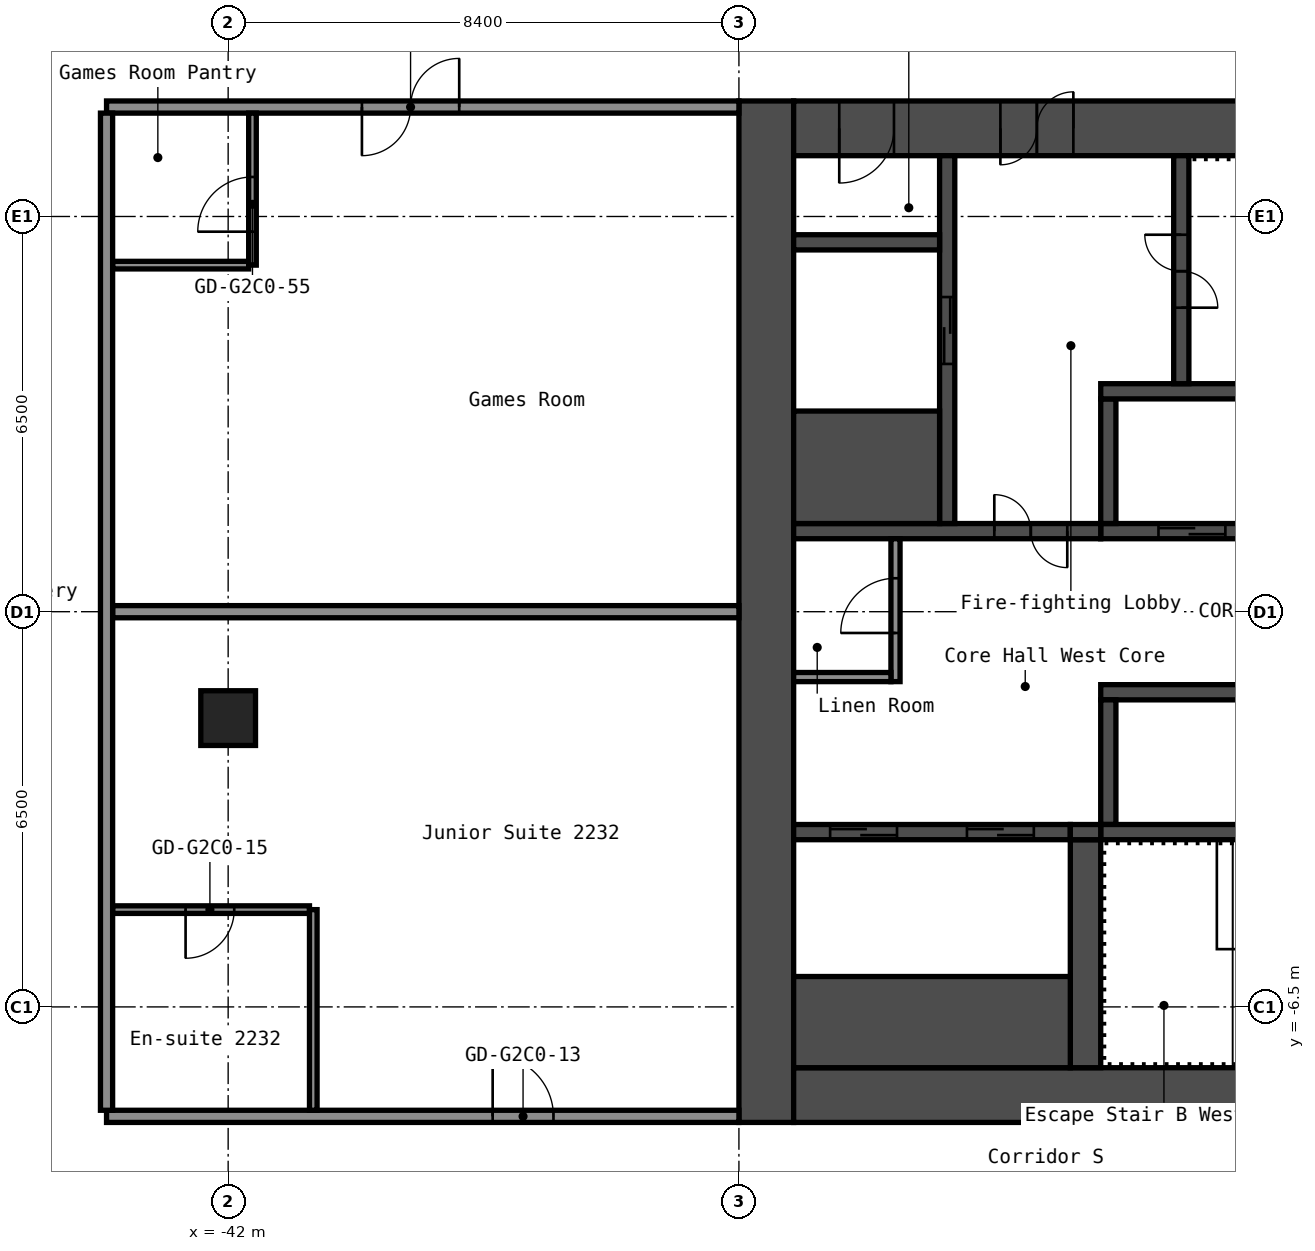
"""IFC4 building model, lengths in metres.
Left out: names, types, materials, properties, quantities, classifications, styles, units other than length and angle.
Written with IfcOpenShell. Run it as: python <this file> out.ifc"""

import sys

from ifc_helpers import new_model, si_unit, direction, frame, frame_2d, origin, origin_2d, place, context, subcontext, project, spatial, rectangle, hollow_rectangle, extrude, element, fill, save


model = new_model("IFC4")
c1 = context("Model", 3, precision=1e-05, world=origin(), true_north=direction((0.0, 1.0)))
c2 = subcontext(c1, "Body", "Model", "MODEL_VIEW")
j1 = project(units=[si_unit("LENGTHUNIT", "METRE"), si_unit("PLANEANGLEUNIT", "RADIAN")], contexts=[c1])
p1 = place(None, origin())
s1 = spatial("IfcSite", under=j1, at=p1, CompositionType="ELEMENT")
p2 = place(p1, origin())
s2 = spatial("IfcBuilding", under=s1, at=p2, CompositionType="ELEMENT")
p3 = place(p2, frame((0.0, 0.0, 81.8)))
s3 = spatial("IfcBuildingStorey", under=s2, at=p3, CompositionType="ELEMENT", Elevation=81.8)
p4 = place(p3, frame((-42.0, -1.75, 0.0), z_axis=(0.0, 0.0, 1.0), x_axis=(1.0, 0.0, 0.0)))
e1 = element("IfcColumn", 1, at=p4, inside=s3, PredefinedType="COLUMN", context=c2, shape_type="SweptSolid", body=[
    extrude(hollow_rectangle(XDim=0.9, YDim=0.9, WallThickness=0.036, at=origin_2d()), origin(), (0.0, 0.0, 1.0), 2.8),
])
p5 = place(p3, frame((-33.15, -8.4, 0.0), z_axis=(0.0, 0.0, 1.0), x_axis=(0.0, 1.0, 0.0)))
e2 = element("IfcWall", 2, at=p5, inside=s3, PredefinedType="SHEAR", context=c2, shape_type="SweptSolid", body=[
    extrude(rectangle(XDim=16.8, YDim=0.9, at=frame_2d((8.4, 0.0))), origin(), (0.0, 0.0, 1.0), 2.8),
])
p6 = place(p3, frame((-32.7, 7.95, 0.0), z_axis=(0.0, 0.0, 1.0), x_axis=(1.0, 0.0, 0.0)))
e3 = element("IfcWall", 3, at=p6, inside=s3, PredefinedType="SHEAR", context=c2, shape_type="SweptSolid", body=[
    extrude(rectangle(XDim=15.0, YDim=0.9, at=frame_2d((7.5, 0.0))), origin(), (0.0, 0.0, 1.0), 2.8),
])
p7 = place(p6, frame((3.4, 0.0, 0.0)))
e4 = element("IfcOpeningElement", 4, at=p7, cuts=e3, PredefinedType="OPENING", context=c2, shape_type="SweptSolid", body=[
    extrude(rectangle(XDim=1.2, YDim=2.1, at=frame_2d((0.6, 1.05))), frame((0.0, 0.46, 0.0), z_axis=(0.0, -1.0, 0.0), x_axis=(1.0, 0.0, 0.0)), (0.0, 0.0, 1.0), 0.92),
])
p8 = place(p6, frame((0.75, 0.0, 0.0)))
e5 = element("IfcOpeningElement", 5, at=p8, cuts=e3, PredefinedType="OPENING", context=c2, shape_type="SweptSolid", body=[
    extrude(rectangle(XDim=0.9, YDim=2.1, at=frame_2d((0.45, 1.05))), frame((0.0, 0.46, 0.0), z_axis=(0.0, -1.0, 0.0), x_axis=(1.0, 0.0, 0.0)), (0.0, 0.0, 1.0), 0.92),
])
p9 = place(p3, frame((-32.7, -7.95, 0.0), z_axis=(0.0, 0.0, 1.0), x_axis=(1.0, 0.0, 0.0)))
e6 = element("IfcWall", 6, at=p9, inside=s3, PredefinedType="SHEAR", context=c2, shape_type="SweptSolid", body=[
    extrude(rectangle(XDim=15.0, YDim=0.9, at=frame_2d((7.5, 0.0))), origin(), (0.0, 0.0, 1.0), 2.8),
])
p10 = place(p9, frame((11.45, 0.0, 0.0)))
e7 = element("IfcOpeningElement", 7, at=p10, cuts=e6, PredefinedType="OPENING", context=c2, shape_type="SweptSolid", body=[
    extrude(rectangle(XDim=1.0, YDim=2.1, at=frame_2d((0.5, 1.05))), frame((0.0, 0.46, 0.0), z_axis=(0.0, -1.0, 0.0), x_axis=(1.0, 0.0, 0.0)), (0.0, 0.0, 1.0), 0.92),
])
p11 = place(p3, frame((-27.65, 1.325, 0.0), z_axis=(0.0, 0.0, 1.0), x_axis=(1.0, 0.0, 0.0)))
e8 = element("IfcWall", 8, at=p11, inside=s3, PredefinedType="SHEAR", context=c2, shape_type="SweptSolid", body=[
    extrude(rectangle(XDim=7.5, YDim=0.25, at=frame_2d((3.75, 0.0))), origin(), (0.0, 0.0, 1.0), 2.8),
])
p12 = place(p11, frame((5.75, 0.0, 0.0)))
e9 = element("IfcOpeningElement", 9, at=p12, cuts=e8, PredefinedType="OPENING", context=c2, shape_type="SweptSolid", body=[
    extrude(rectangle(XDim=1.1, YDim=2.1, at=frame_2d((0.55, 1.05))), frame((0.0, 0.135, 0.0), z_axis=(0.0, -1.0, 0.0), x_axis=(1.0, 0.0, 0.0)), (0.0, 0.0, 1.0), 0.27),
])
p13 = place(p11, frame((3.35, 0.0, 0.0)))
e10 = element("IfcOpeningElement", 10, at=p13, cuts=e8, PredefinedType="OPENING", context=c2, shape_type="SweptSolid", body=[
    extrude(rectangle(XDim=1.1, YDim=2.1, at=frame_2d((0.55, 1.05))), frame((0.0, 0.135, 0.0), z_axis=(0.0, -1.0, 0.0), x_axis=(1.0, 0.0, 0.0)), (0.0, 0.0, 1.0), 0.27),
])
p14 = place(p11, frame((0.95, 0.0, 0.0)))
e11 = element("IfcOpeningElement", 11, at=p14, cuts=e8, PredefinedType="OPENING", context=c2, shape_type="SweptSolid", body=[
    extrude(rectangle(XDim=1.1, YDim=2.1, at=frame_2d((0.55, 1.05))), frame((0.0, 0.135, 0.0), z_axis=(0.0, -1.0, 0.0), x_axis=(1.0, 0.0, 0.0)), (0.0, 0.0, 1.0), 0.27),
])
p15 = place(p3, frame((-27.525, 1.45, 0.0), z_axis=(0.0, 0.0, 1.0), x_axis=(0.0, 1.0, 0.0)))
e12 = element("IfcWall", 12, at=p15, inside=s3, PredefinedType="SHEAR", context=c2, shape_type="SweptSolid", body=[
    extrude(rectangle(XDim=2.05, YDim=0.25, at=frame_2d((1.025, 0.0))), origin(), (0.0, 0.0, 1.0), 2.8),
])
p16 = place(p3, frame((-27.65, 3.625, 0.0), z_axis=(0.0, 0.0, 1.0), x_axis=(1.0, 0.0, 0.0)))
e13 = element("IfcWall", 13, at=p16, inside=s3, PredefinedType="SHEAR", context=c2, shape_type="SweptSolid", body=[
    extrude(rectangle(XDim=7.5, YDim=0.25, at=frame_2d((3.75, 0.0))), origin(), (0.0, 0.0, 1.0), 2.8),
])
p17 = place(p3, frame((-26.325, 3.75, 0.0), z_axis=(0.0, 0.0, 1.0), x_axis=(0.0, 1.0, 0.0)))
e14 = element("IfcWall", 14, at=p17, inside=s3, PredefinedType="SHEAR", context=c2, shape_type="SweptSolid", body=[
    extrude(rectangle(XDim=3.75, YDim=0.25, at=frame_2d((1.875, 0.0))), origin(), (0.0, 0.0, 1.0), 2.8),
])
p18 = place(p17, frame((1.25, 0.0, 0.0)))
e15 = element("IfcOpeningElement", 15, at=p18, cuts=e14, PredefinedType="OPENING", context=c2, shape_type="SweptSolid", body=[
    extrude(rectangle(XDim=1.2, YDim=2.1, at=frame_2d((0.6, 1.05))), frame((0.0, 0.135, 0.0), z_axis=(0.0, -1.0, 0.0), x_axis=(1.0, 0.0, 0.0)), (0.0, 0.0, 1.0), 0.27),
])
p19 = place(p3, frame((-32.7, 1.325, 0.0), z_axis=(0.0, 0.0, 1.0), x_axis=(1.0, 0.0, 0.0)))
e16 = element("IfcWall", 16, at=p19, inside=s3, PredefinedType="SHEAR", context=c2, shape_type="SweptSolid", body=[
    extrude(rectangle(XDim=5.05, YDim=0.25, at=frame_2d((2.525, 0.0))), origin(), (0.0, 0.0, 1.0), 2.8),
])
p20 = place(p19, frame((3.3, 0.0, 0.0)))
e17 = element("IfcOpeningElement", 17, at=p20, cuts=e16, PredefinedType="OPENING", context=c2, shape_type="SweptSolid", body=[
    extrude(rectangle(XDim=1.2, YDim=2.1, at=frame_2d((0.6, 1.05))), frame((0.0, 0.135, 0.0), z_axis=(0.0, -1.0, 0.0), x_axis=(1.0, 0.0, 0.0)), (0.0, 0.0, 1.0), 0.27),
])
p21 = place(p3, frame((-30.175, 1.45, 0.0), z_axis=(0.0, 0.0, 1.0), x_axis=(0.0, 1.0, 0.0)))
e18 = element("IfcWall", 18, at=p21, inside=s3, PredefinedType="SHEAR", context=c2, shape_type="SweptSolid", body=[
    extrude(rectangle(XDim=6.05, YDim=0.25, at=frame_2d((3.025, 0.0))), origin(), (0.0, 0.0, 1.0), 2.8),
])
p22 = place(p21, frame((2.625, 0.0, 0.0)))
e19 = element("IfcOpeningElement", 19, at=p22, cuts=e18, PredefinedType="OPENING", context=c2, shape_type="SweptSolid", body=[
    extrude(rectangle(XDim=1.1, YDim=2.1, at=frame_2d((0.55, 1.05))), frame((0.0, 0.135, 0.0), z_axis=(0.0, -1.0, 0.0), x_axis=(1.0, 0.0, 0.0)), (0.0, 0.0, 1.0), 0.27),
])
p23 = place(p3, frame((-32.7, 2.375, 0.0), z_axis=(0.0, 0.0, 1.0), x_axis=(1.0, 0.0, 0.0)))
e20 = element("IfcWall", 20, at=p23, inside=s3, PredefinedType="SHEAR", context=c2, shape_type="SweptSolid", body=[
    extrude(rectangle(XDim=2.4, YDim=1.85, at=frame_2d((1.2, 0.0))), origin(), (0.0, 0.0, 1.0), 2.8),
])
p24 = place(p3, frame((-32.7, 6.075, 0.0), z_axis=(0.0, 0.0, 1.0), x_axis=(1.0, 0.0, 0.0)))
e21 = element("IfcWall", 21, at=p24, inside=s3, PredefinedType="SHEAR", context=c2, shape_type="SweptSolid", body=[
    extrude(rectangle(XDim=2.4, YDim=0.25, at=frame_2d((1.2, 0.0))), origin(), (0.0, 0.0, 1.0), 2.8),
])
p25 = place(p3, frame((-27.65, -1.325, 0.0), z_axis=(0.0, 0.0, 1.0), x_axis=(1.0, 0.0, 0.0)))
e22 = element("IfcWall", 22, at=p25, inside=s3, PredefinedType="SHEAR", context=c2, shape_type="SweptSolid", body=[
    extrude(rectangle(XDim=7.5, YDim=0.25, at=frame_2d((3.75, 0.0))), origin(), (0.0, 0.0, 1.0), 2.8),
])
p26 = place(p3, frame((-27.525, -3.5, 0.0), z_axis=(0.0, 0.0, 1.0), x_axis=(0.0, 1.0, 0.0)))
e23 = element("IfcWall", 23, at=p26, inside=s3, PredefinedType="SHEAR", context=c2, shape_type="SweptSolid", body=[
    extrude(rectangle(XDim=2.05, YDim=0.25, at=frame_2d((1.025, 0.0))), origin(), (0.0, 0.0, 1.0), 2.8),
])
p27 = place(p3, frame((-27.65, -3.625, 0.0), z_axis=(0.0, 0.0, 1.0), x_axis=(1.0, 0.0, 0.0)))
e24 = element("IfcWall", 24, at=p27, inside=s3, PredefinedType="SHEAR", context=c2, shape_type="SweptSolid", body=[
    extrude(rectangle(XDim=7.5, YDim=0.25, at=frame_2d((3.75, 0.0))), origin(), (0.0, 0.0, 1.0), 2.8),
])
p28 = place(p3, frame((-27.9, -7.5, 0.0), z_axis=(0.0, 0.0, 1.0), x_axis=(0.0, 1.0, 0.0)))
e25 = element("IfcWall", 25, at=p28, inside=s3, PredefinedType="SHEAR", context=c2, shape_type="SweptSolid", body=[
    extrude(rectangle(XDim=3.75, YDim=0.5, at=frame_2d((1.875, 0.0))), origin(), (0.0, 0.0, 1.0), 2.8),
])
p29 = place(p3, frame((-32.7, -3.625, 0.0), z_axis=(0.0, 0.0, 1.0), x_axis=(1.0, 0.0, 0.0)))
e26 = element("IfcWall", 26, at=p29, inside=s3, PredefinedType="SHEAR", context=c2, shape_type="SweptSolid", body=[
    extrude(rectangle(XDim=4.55, YDim=0.25, at=frame_2d((2.275, 0.0))), origin(), (0.0, 0.0, 1.0), 2.8),
])
p30 = place(p29, frame((2.85, 0.0, 0.0)))
e27 = element("IfcOpeningElement", 27, at=p30, cuts=e26, PredefinedType="OPENING", context=c2, shape_type="SweptSolid", body=[
    extrude(rectangle(XDim=1.1, YDim=2.1, at=frame_2d((0.55, 1.05))), frame((0.0, 0.135, 0.0), z_axis=(0.0, -1.0, 0.0), x_axis=(1.0, 0.0, 0.0)), (0.0, 0.0, 1.0), 0.27),
])
p31 = place(p29, frame((0.6, 0.0, 0.0)))
e28 = element("IfcOpeningElement", 28, at=p31, cuts=e26, PredefinedType="OPENING", context=c2, shape_type="SweptSolid", body=[
    extrude(rectangle(XDim=1.1, YDim=2.1, at=frame_2d((0.55, 1.05))), frame((0.0, 0.135, 0.0), z_axis=(0.0, -1.0, 0.0), x_axis=(1.0, 0.0, 0.0)), (0.0, 0.0, 1.0), 0.27),
])
p32 = place(p3, frame((-32.7, -6.75, 0.0), z_axis=(0.0, 0.0, 1.0), x_axis=(1.0, 0.0, 0.0)))
e29 = element("IfcWall", 29, at=p32, inside=s3, PredefinedType="SHEAR", context=c2, shape_type="SweptSolid", body=[
    extrude(rectangle(XDim=4.55, YDim=1.5, at=frame_2d((2.275, 0.0))), origin(), (0.0, 0.0, 1.0), 2.8),
])
p33 = place(p3, frame((-28.15, -3.625, 0.0), z_axis=(0.0, 0.0, 1.0), x_axis=(1.0, 0.0, 0.0)))
e30 = element("IfcWall", 30, at=p33, inside=s3, PredefinedType="SHEAR", context=c2, shape_type="SweptSolid", body=[
    extrude(rectangle(XDim=0.5, YDim=0.25, at=frame_2d((0.25, 0.0))), origin(), (0.0, 0.0, 1.0), 2.8),
])
p34 = place(p3, frame((-31.025, -1.15, 0.0), z_axis=(0.0, 0.0, 1.0), x_axis=(0.0, 1.0, 0.0)))
e31 = element("IfcWall", 31, at=p34, inside=s3, PredefinedType="PARTITIONING", context=c2, shape_type="SweptSolid", body=[
    extrude(rectangle(XDim=2.35, YDim=0.15, at=frame_2d((1.175, 0.0))), origin(), (0.0, 0.0, 1.0), 2.8),
])
p35 = place(p34, frame((0.8, 0.0, 0.0)))
e32 = element("IfcOpeningElement", 32, at=p35, cuts=e31, PredefinedType="OPENING", context=c2, shape_type="SweptSolid", body=[
    extrude(rectangle(XDim=0.9, YDim=2.1, at=frame_2d((0.45, 1.05))), frame((0.0, 0.085, 0.0), z_axis=(0.0, -1.0, 0.0), x_axis=(1.0, 0.0, 0.0)), (0.0, 0.0, 1.0), 0.17),
])
p36 = place(p3, frame((-32.7, -1.075, 0.0), z_axis=(0.0, 0.0, 1.0), x_axis=(1.0, 0.0, 0.0)))
e33 = element("IfcWall", 33, at=p36, inside=s3, PredefinedType="PARTITIONING", context=c2, shape_type="SweptSolid", body=[
    extrude(rectangle(XDim=1.6, YDim=0.15, at=frame_2d((0.8, 0.0))), origin(), (0.0, 0.0, 1.0), 2.8),
])
p37 = place(p3, frame((-44.0, -8.3, 0.0), z_axis=(0.0, 0.0, 1.0), x_axis=(1.0, 0.0, 0.0)))
e34 = element("IfcWall", 34, at=p37, inside=s3, PredefinedType="PARTITIONING", context=c2, shape_type="SweptSolid", body=[
    extrude(rectangle(XDim=10.4, YDim=0.2, at=frame_2d((5.2, 0.0))), origin(), (0.0, 0.0, 1.0), 2.8),
])
p38 = place(p37, frame((6.35, 0.0, 0.0)))
e35 = element("IfcOpeningElement", 35, at=p38, cuts=e34, PredefinedType="OPENING", context=c2, shape_type="SweptSolid", body=[
    extrude(rectangle(XDim=1.0, YDim=2.1, at=frame_2d((0.5, 1.05))), frame((0.0, 0.11, 0.0), z_axis=(0.0, -1.0, 0.0), x_axis=(1.0, 0.0, 0.0)), (0.0, 0.0, 1.0), 0.22),
])
p39 = place(p3, frame((-43.9, -4.9, 0.0), z_axis=(0.0, 0.0, 1.0), x_axis=(1.0, 0.0, 0.0)))
e36 = element("IfcWall", 36, at=p39, inside=s3, PredefinedType="PARTITIONING", context=c2, shape_type="SweptSolid", body=[
    extrude(rectangle(XDim=3.237, YDim=0.125, at=frame_2d((1.619, 0.0))), origin(), (0.0, 0.0, 1.0), 2.8),
])
p40 = place(p39, frame((1.2, 0.0, 0.0)))
e37 = element("IfcOpeningElement", 37, at=p40, cuts=e36, PredefinedType="OPENING", context=c2, shape_type="SweptSolid", body=[
    extrude(rectangle(XDim=0.8, YDim=2.1, at=frame_2d((0.4, 1.05))), frame((0.0, 0.073, 0.0), z_axis=(0.0, -1.0, 0.0), x_axis=(1.0, 0.0, 0.0)), (0.0, 0.0, 1.0), 0.145),
])
p41 = place(p3, frame((-43.9, 0.0, 0.0), z_axis=(0.0, 0.0, 1.0), x_axis=(1.0, 0.0, 0.0)))
e38 = element("IfcWall", 38, at=p41, inside=s3, PredefinedType="PARTITIONING", context=c2, shape_type="SweptSolid", body=[
    extrude(rectangle(XDim=10.3, YDim=0.2, at=frame_2d((5.15, 0.0))), origin(), (0.0, 0.0, 1.0), 2.8),
])
p42 = place(p3, frame((-43.9, 5.7, 0.0), z_axis=(0.0, 0.0, 1.0), x_axis=(1.0, 0.0, 0.0)))
e39 = element("IfcWall", 39, at=p42, inside=s3, PredefinedType="PARTITIONING", context=c2, shape_type="SweptSolid", body=[
    extrude(rectangle(XDim=2.237, YDim=0.125, at=frame_2d((1.119, 0.0))), origin(), (0.0, 0.0, 1.0), 2.8),
])
p43 = place(p3, frame((-44.0, 8.3, 0.0), z_axis=(0.0, 0.0, 1.0), x_axis=(1.0, 0.0, 0.0)))
e40 = element("IfcWall", 40, at=p43, inside=s3, PredefinedType="PARTITIONING", context=c2, shape_type="SweptSolid", body=[
    extrude(rectangle(XDim=10.4, YDim=0.2, at=frame_2d((5.2, 0.0))), origin(), (0.0, 0.0, 1.0), 2.8),
])
p44 = place(p43, frame((4.2, 0.0, 0.0)))
e41 = element("IfcOpeningElement", 41, at=p44, cuts=e40, PredefinedType="OPENING", context=c2, shape_type="SweptSolid", body=[
    extrude(rectangle(XDim=1.6, YDim=2.1, at=frame_2d((0.8, 1.05))), frame((0.0, 0.11, 0.0), z_axis=(0.0, -1.0, 0.0), x_axis=(1.0, 0.0, 0.0)), (0.0, 0.0, 1.0), 0.22),
])
p45 = place(p3, frame((-44.0, -8.2, 0.0), z_axis=(0.0, 0.0, 1.0), x_axis=(0.0, 1.0, 0.0)))
e42 = element("IfcWall", 42, at=p45, inside=s3, PredefinedType="PARTITIONING", context=c2, shape_type="SweptSolid", body=[
    extrude(rectangle(XDim=16.4, YDim=0.2, at=frame_2d((8.2, 0.0))), origin(), (0.0, 0.0, 1.0), 2.8),
])
p46 = place(p3, frame((-41.6, 5.7, 0.0), z_axis=(0.0, 0.0, 1.0), x_axis=(0.0, 1.0, 0.0)))
e43 = element("IfcWall", 43, at=p46, inside=s3, PredefinedType="PARTITIONING", context=c2, shape_type="SweptSolid", body=[
    extrude(rectangle(XDim=2.5, YDim=0.125, at=frame_2d((1.25, 0.0))), origin(), (0.0, 0.0, 1.0), 2.8),
])
p47 = place(p46, frame((0.55, 0.0, 0.0)))
e44 = element("IfcOpeningElement", 44, at=p47, cuts=e43, PredefinedType="OPENING", context=c2, shape_type="SweptSolid", body=[
    extrude(rectangle(XDim=0.9, YDim=2.1, at=frame_2d((0.45, 1.05))), frame((0.0, 0.073, 0.0), z_axis=(0.0, -1.0, 0.0), x_axis=(1.0, 0.0, 0.0)), (0.0, 0.0, 1.0), 0.145),
])
p48 = place(p3, frame((-40.6, -8.2, 0.0), z_axis=(0.0, 0.0, 1.0), x_axis=(0.0, 1.0, 0.0)))
e45 = element("IfcWall", 45, at=p48, inside=s3, PredefinedType="PARTITIONING", context=c2, shape_type="SweptSolid", body=[
    extrude(rectangle(XDim=3.3, YDim=0.125, at=frame_2d((1.65, 0.0))), origin(), (0.0, 0.0, 1.0), 2.8),
])
p49 = place(p7, origin())
e46 = element("IfcDoor", 46, at=p49, inside=s3, OperationType="DOUBLE_DOOR_SINGLE_SWING", PredefinedType="DOOR", context=c2, shape_type="SweptSolid", body=[
    extrude(rectangle(XDim=1.2, YDim=2.1, at=frame_2d((0.6, 1.05))), frame((0.0, 0.025, 0.0), z_axis=(0.0, -1.0, 0.0), x_axis=(1.0, 0.0, 0.0)), (0.0, 0.0, 1.0), 0.05),
])
fill(e4, e46)
p50 = place(p8, origin())
e47 = element("IfcDoor", 47, at=p50, inside=s3, OperationType="SINGLE_SWING_LEFT", PredefinedType="DOOR", context=c2, shape_type="SweptSolid", body=[
    extrude(rectangle(XDim=0.9, YDim=2.1, at=frame_2d((0.45, 1.05))), frame((0.0, 0.025, 0.0), z_axis=(0.0, -1.0, 0.0), x_axis=(1.0, 0.0, 0.0)), (0.0, 0.0, 1.0), 0.05),
])
fill(e5, e47)
p51 = place(p18, origin())
e48 = element("IfcDoor", 48, at=p51, inside=s3, OperationType="DOUBLE_DOOR_SINGLE_SWING", PredefinedType="DOOR", context=c2, shape_type="SweptSolid", body=[
    extrude(rectangle(XDim=1.2, YDim=2.1, at=frame_2d((0.6, 1.05))), frame((0.0, 0.025, 0.0), z_axis=(0.0, -1.0, 0.0), x_axis=(1.0, 0.0, 0.0)), (0.0, 0.0, 1.0), 0.05),
])
fill(e15, e48)
p52 = place(p20, origin())
e49 = element("IfcDoor", 49, at=p52, inside=s3, OperationType="DOUBLE_DOOR_SINGLE_SWING", PredefinedType="DOOR", context=c2, shape_type="SweptSolid", body=[
    extrude(rectangle(XDim=1.2, YDim=2.1, at=frame_2d((0.6, 1.05))), frame((0.0, 0.025, 0.0), z_axis=(0.0, -1.0, 0.0), x_axis=(1.0, 0.0, 0.0)), (0.0, 0.0, 1.0), 0.05),
])
fill(e17, e49)
p53 = place(p35, origin())
e50 = element("IfcDoor", 50, at=p53, inside=s3, OperationType="SINGLE_SWING_RIGHT", PredefinedType="DOOR", context=c2, shape_type="SweptSolid", body=[
    extrude(rectangle(XDim=0.9, YDim=2.1, at=frame_2d((0.45, 1.05))), frame((0.0, 0.025, 0.0), z_axis=(0.0, -1.0, 0.0), x_axis=(1.0, 0.0, 0.0)), (0.0, 0.0, 1.0), 0.05),
])
fill(e32, e50)
p54 = place(p14, origin())
e51 = element("IfcDoor", 51, at=p54, inside=s3, OperationType="DOUBLE_DOOR_SLIDING", PredefinedType="DOOR", context=c2, shape_type="SweptSolid", body=[
    extrude(rectangle(XDim=1.1, YDim=2.1, at=frame_2d((0.55, 1.05))), frame((0.0, 0.025, 0.0), z_axis=(0.0, -1.0, 0.0), x_axis=(1.0, 0.0, 0.0)), (0.0, 0.0, 1.0), 0.05),
])
fill(e11, e51)
p55 = place(p22, origin())
e52 = element("IfcDoor", 52, at=p55, inside=s3, OperationType="DOUBLE_DOOR_SLIDING", PredefinedType="DOOR", context=c2, shape_type="SweptSolid", body=[
    extrude(rectangle(XDim=1.1, YDim=2.1, at=frame_2d((0.55, 1.05))), frame((0.0, 0.025, 0.0), z_axis=(0.0, -1.0, 0.0), x_axis=(1.0, 0.0, 0.0)), (0.0, 0.0, 1.0), 0.05),
])
fill(e19, e52)
p56 = place(p30, origin())
e53 = element("IfcDoor", 53, at=p56, inside=s3, OperationType="DOUBLE_DOOR_SLIDING", PredefinedType="DOOR", context=c2, shape_type="SweptSolid", body=[
    extrude(rectangle(XDim=1.1, YDim=2.1, at=frame_2d((0.55, 1.05))), frame((0.0, 0.025, 0.0), z_axis=(0.0, -1.0, 0.0), x_axis=(1.0, 0.0, 0.0)), (0.0, 0.0, 1.0), 0.05),
])
fill(e27, e53)
p57 = place(p31, origin())
e54 = element("IfcDoor", 54, at=p57, inside=s3, OperationType="DOUBLE_DOOR_SLIDING", PredefinedType="DOOR", context=c2, shape_type="SweptSolid", body=[
    extrude(rectangle(XDim=1.1, YDim=2.1, at=frame_2d((0.55, 1.05))), frame((0.0, 0.025, 0.0), z_axis=(0.0, -1.0, 0.0), x_axis=(1.0, 0.0, 0.0)), (0.0, 0.0, 1.0), 0.05),
])
fill(e28, e54)
p58 = place(p38, origin())
e55 = element("IfcDoor", 55, at=p58, inside=s3, OperationType="SINGLE_SWING_RIGHT", PredefinedType="DOOR", context=c2, shape_type="SweptSolid", body=[
    extrude(rectangle(XDim=1.0, YDim=2.1, at=frame_2d((0.5, 1.05))), frame((0.0, 0.025, 0.0), z_axis=(0.0, -1.0, 0.0), x_axis=(1.0, 0.0, 0.0)), (0.0, 0.0, 1.0), 0.05),
])
fill(e35, e55)
p59 = place(p40, origin())
e56 = element("IfcDoor", 56, at=p59, inside=s3, OperationType="SINGLE_SWING_LEFT", PredefinedType="DOOR", context=c2, shape_type="SweptSolid", body=[
    extrude(rectangle(XDim=0.8, YDim=2.1, at=frame_2d((0.4, 1.05))), frame((0.0, 0.025, 0.0), z_axis=(0.0, -1.0, 0.0), x_axis=(1.0, 0.0, 0.0)), (0.0, 0.0, 1.0), 0.05),
])
fill(e37, e56)
p60 = place(p44, origin())
e57 = element("IfcDoor", 57, at=p60, inside=s3, OperationType="DOUBLE_DOOR_SINGLE_SWING", PredefinedType="DOOR", context=c2, shape_type="SweptSolid", body=[
    extrude(rectangle(XDim=1.6, YDim=2.1, at=frame_2d((0.8, 1.05))), frame((0.0, 0.025, 0.0), z_axis=(0.0, -1.0, 0.0), x_axis=(1.0, 0.0, 0.0)), (0.0, 0.0, 1.0), 0.05),
])
fill(e41, e57)
p61 = place(p47, origin())
e58 = element("IfcDoor", 58, at=p61, inside=s3, OperationType="SINGLE_SWING_RIGHT", PredefinedType="DOOR", context=c2, shape_type="SweptSolid", body=[
    extrude(rectangle(XDim=0.9, YDim=2.1, at=frame_2d((0.45, 1.05))), frame((0.0, 0.025, 0.0), z_axis=(0.0, -1.0, 0.0), x_axis=(1.0, 0.0, 0.0)), (0.0, 0.0, 1.0), 0.05),
])
fill(e44, e58)
save(model, sys.argv[1])
